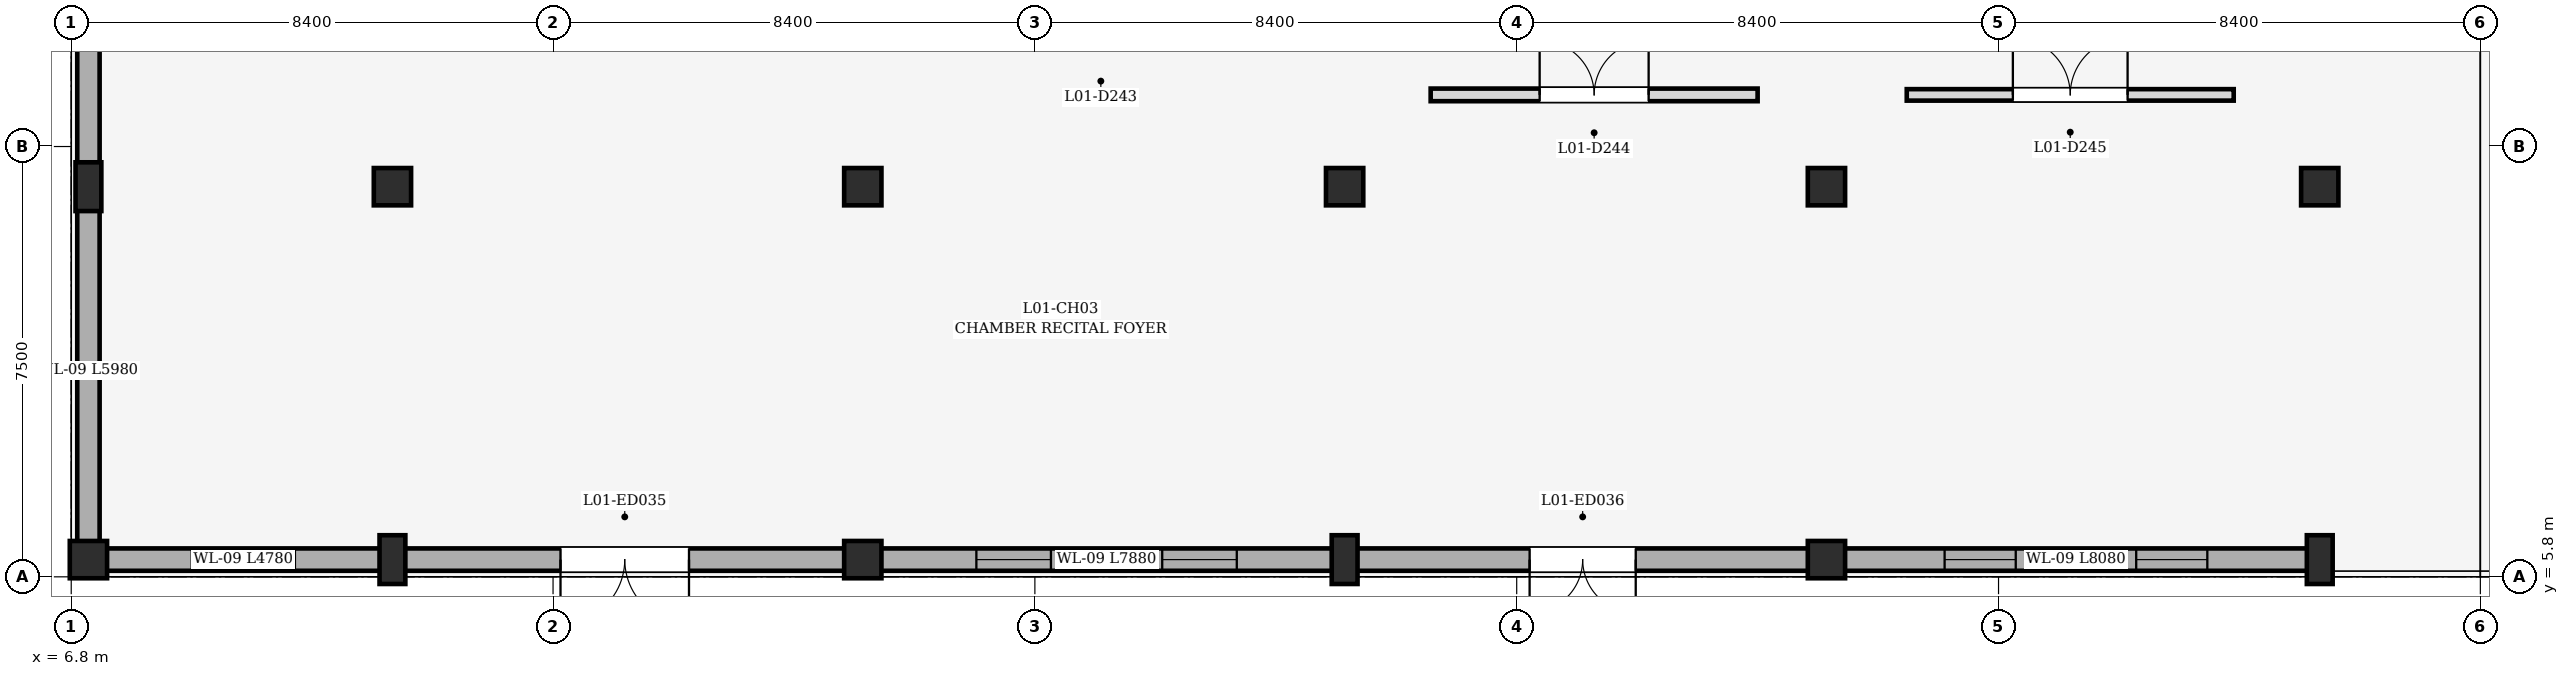
"""IFC4 building model, lengths in metres.
Left out: names, types, materials, properties, quantities, classifications, styles, units other than length and angle.
Written with IfcOpenShell. Run it as: python <this file> out.ifc"""

import sys

from ifc_helpers import new_model, si_unit, direction, frame, frame_2d, origin, origin_2d, place, context, subcontext, project, spatial, rectangle, extrude, element, fill, save


model = new_model("IFC4")
c1 = context("Model", 3, precision=1e-05, world=origin(), true_north=direction((0.0, 1.0)))
c2 = subcontext(c1, "Body", "Model", "MODEL_VIEW")
j1 = project(units=[si_unit("LENGTHUNIT", "METRE"), si_unit("PLANEANGLEUNIT", "RADIAN")], contexts=[c1])
p1 = place(None, origin())
s1 = spatial("IfcSite", under=j1, at=p1, CompositionType="ELEMENT")
p2 = place(p1, origin())
s2 = spatial("IfcBuilding", under=s1, at=p2, CompositionType="ELEMENT")
p3 = place(p2, origin())
s3 = spatial("IfcBuildingStorey", under=s2, at=p3, CompositionType="ELEMENT", Elevation=0.0)
p4 = place(p3, frame((7.1, 6.1, 0.0), z_axis=(0.0, 0.0, 1.0), x_axis=(1.0, 0.0, 0.0)))
e1 = element("IfcColumn", 1, at=p4, inside=s3, PredefinedType="COLUMN", context=c2, shape_type="SweptSolid", body=[
    extrude(rectangle(XDim=0.65, YDim=0.65, at=origin_2d()), origin(), (0.0, 0.0, 1.0), 5.4),
])
for number, where, z_axis, x_axis in (
    (2, (7.1, 12.6, 0.0), (0.0, 0.0, 1.0), (1.0, 0.0, 0.0)),
    (3, (12.4, 6.1, 0.0), (0.0, 0.0, 1.0), (1.0, 0.0, 0.0)),
):
    element("IfcColumn", number, at=place(p3, frame(where, z_axis=z_axis, x_axis=x_axis)), inside=s3, PredefinedType="PILASTER", context=c2, shape_type="SweptSolid", body=[
        extrude(rectangle(XDim=0.45, YDim=0.85, at=origin_2d()), origin(), (0.0, 0.0, 1.0), 5.4),
    ])
for number, where, z_axis, x_axis in (
    (4, (12.4, 12.6, 0.0), (0.0, 0.0, 1.0), (1.0, 0.0, 0.0)),
    (5, (20.6, 6.1, 0.0), (0.0, 0.0, 1.0), (1.0, 0.0, 0.0)),
    (6, (20.6, 12.6, 0.0), (0.0, 0.0, 1.0), (1.0, 0.0, 0.0)),
):
    element("IfcColumn", number, at=place(p3, frame(where, z_axis=z_axis, x_axis=x_axis)), inside=s3, PredefinedType="COLUMN", context=c2, shape_type="SweptSolid", body=[
        extrude(rectangle(XDim=0.65, YDim=0.65, at=origin_2d()), origin(), (0.0, 0.0, 1.0), 5.4),
    ])
p5 = place(p3, frame((29.0, 6.1, 0.0), z_axis=(0.0, 0.0, 1.0), x_axis=(1.0, 0.0, 0.0)))
e7 = element("IfcColumn", 7, at=p5, inside=s3, PredefinedType="PILASTER", context=c2, shape_type="SweptSolid", body=[
    extrude(rectangle(XDim=0.45, YDim=0.85, at=origin_2d()), origin(), (0.0, 0.0, 1.0), 5.4),
])
for number, where, z_axis, x_axis in (
    (8, (29.0, 12.6, 0.0), (0.0, 0.0, 1.0), (1.0, 0.0, 0.0)),
    (9, (37.4, 6.1, 0.0), (0.0, 0.0, 1.0), (1.0, 0.0, 0.0)),
    (10, (37.4, 12.6, 0.0), (0.0, 0.0, 1.0), (1.0, 0.0, 0.0)),
):
    element("IfcColumn", number, at=place(p3, frame(where, z_axis=z_axis, x_axis=x_axis)), inside=s3, PredefinedType="COLUMN", context=c2, shape_type="SweptSolid", body=[
        extrude(rectangle(XDim=0.65, YDim=0.65, at=origin_2d()), origin(), (0.0, 0.0, 1.0), 5.4),
    ])
p6 = place(p3, frame((46.0, 6.1, 0.0), z_axis=(0.0, 0.0, 1.0), x_axis=(1.0, 0.0, 0.0)))
e11 = element("IfcColumn", 11, at=p6, inside=s3, PredefinedType="PILASTER", context=c2, shape_type="SweptSolid", body=[
    extrude(rectangle(XDim=0.45, YDim=0.85, at=origin_2d()), origin(), (0.0, 0.0, 1.0), 5.4),
])
p7 = place(p3, frame((46.0, 12.6, 0.0), z_axis=(0.0, 0.0, 1.0), x_axis=(1.0, 0.0, 0.0)))
e12 = element("IfcColumn", 12, at=p7, inside=s3, PredefinedType="COLUMN", context=c2, shape_type="SweptSolid", body=[
    extrude(rectangle(XDim=0.65, YDim=0.65, at=origin_2d()), origin(), (0.0, 0.0, 1.0), 5.4),
])
p8 = place(p3, frame((12.19, 6.1, 0.0), z_axis=(0.0, 0.0, 1.0), x_axis=(-1.0, 0.0, 0.0)))
e13 = element("IfcWall", 13, at=p8, inside=s3, PredefinedType="STANDARD", context=c2, shape_type="SweptSolid", body=[
    extrude(rectangle(XDim=4.78, YDim=0.39, at=frame_2d((2.39, 0.0))), origin(), (0.0, 0.0, 1.0), 4.6),
])
p9 = place(p8, frame((1.49, 0.0, 0.85)))
e14 = element("IfcOpeningElement", 14, at=p9, cuts=e13, PredefinedType="OPENING", context=c2, shape_type="SweptSolid", body=[
    extrude(rectangle(XDim=1.8, YDim=2.2, at=frame_2d((0.9, 1.1))), frame((0.0, 0.207, 0.0), z_axis=(0.0, -1.0, 0.0), x_axis=(1.0, 0.0, 0.0)), (0.0, 0.0, 1.0), 0.414),
])
p10 = place(p3, frame((20.29, 6.1, 0.0), z_axis=(0.0, 0.0, 1.0), x_axis=(-1.0, 0.0, 0.0)))
e15 = element("IfcWall", 15, at=p10, inside=s3, PredefinedType="STANDARD", context=c2, shape_type="SweptSolid", body=[
    extrude(rectangle(XDim=7.68, YDim=0.39, at=frame_2d((3.84, 0.0))), origin(), (0.0, 0.0, 1.0), 4.6),
])
p11 = place(p10, frame((2.72, 0.0, 0.0)))
e16 = element("IfcOpeningElement", 16, at=p11, cuts=e15, PredefinedType="OPENING", context=c2, shape_type="SweptSolid", body=[
    extrude(rectangle(XDim=2.24, YDim=2.35, at=frame_2d((1.12, 1.175))), frame((0.0, 0.207, 0.0), z_axis=(0.0, -1.0, 0.0), x_axis=(1.0, 0.0, 0.0)), (0.0, 0.0, 1.0), 0.414),
])
p12 = place(p3, frame((28.79, 6.1, 0.0), z_axis=(0.0, 0.0, 1.0), x_axis=(-1.0, 0.0, 0.0)))
e17 = element("IfcWall", 17, at=p12, inside=s3, PredefinedType="STANDARD", context=c2, shape_type="SweptSolid", body=[
    extrude(rectangle(XDim=7.88, YDim=0.39, at=frame_2d((3.94, 0.0))), origin(), (0.0, 0.0, 1.0), 4.6),
])
p13 = place(p12, frame((1.67, 0.0, 0.85)))
e18 = element("IfcOpeningElement", 18, at=p13, cuts=e17, PredefinedType="OPENING", context=c2, shape_type="SweptSolid", body=[
    extrude(rectangle(XDim=1.3, YDim=1.95, at=frame_2d((0.65, 0.975))), frame((0.0, 0.207, 0.0), z_axis=(0.0, -1.0, 0.0), x_axis=(1.0, 0.0, 0.0)), (0.0, 0.0, 1.0), 0.414),
])
p14 = place(p12, frame((4.91, 0.0, 0.85)))
e19 = element("IfcOpeningElement", 19, at=p14, cuts=e17, PredefinedType="OPENING", context=c2, shape_type="SweptSolid", body=[
    extrude(rectangle(XDim=1.3, YDim=1.95, at=frame_2d((0.65, 0.975))), frame((0.0, 0.207, 0.0), z_axis=(0.0, -1.0, 0.0), x_axis=(1.0, 0.0, 0.0)), (0.0, 0.0, 1.0), 0.414),
])
p15 = place(p3, frame((37.09, 6.1, 0.0), z_axis=(0.0, 0.0, 1.0), x_axis=(-1.0, 0.0, 0.0)))
e20 = element("IfcWall", 20, at=p15, inside=s3, PredefinedType="STANDARD", context=c2, shape_type="SweptSolid", body=[
    extrude(rectangle(XDim=7.88, YDim=0.39, at=frame_2d((3.94, 0.0))), origin(), (0.0, 0.0, 1.0), 4.579),
])
p16 = place(p15, frame((3.015, 0.0, 0.0)))
e21 = element("IfcOpeningElement", 21, at=p16, cuts=e20, PredefinedType="OPENING", context=c2, shape_type="SweptSolid", body=[
    extrude(rectangle(XDim=1.85, YDim=2.25, at=frame_2d((0.925, 1.125))), frame((0.0, 0.207, 0.0), z_axis=(0.0, -1.0, 0.0), x_axis=(1.0, 0.0, 0.0)), (0.0, 0.0, 1.0), 0.414),
])
p17 = place(p3, frame((45.79, 6.1, 0.0), z_axis=(0.0, 0.0, 1.0), x_axis=(-1.0, 0.0, 0.0)))
e22 = element("IfcWall", 22, at=p17, inside=s3, PredefinedType="STANDARD", context=c2, shape_type="SweptSolid", body=[
    extrude(rectangle(XDim=8.08, YDim=0.39, at=frame_2d((4.04, 0.0))), origin(), (0.0, 0.0, 1.0), 4.505),
])
p18 = place(p17, frame((1.75, 0.0, 0.85)))
e23 = element("IfcOpeningElement", 23, at=p18, cuts=e22, PredefinedType="OPENING", context=c2, shape_type="SweptSolid", body=[
    extrude(rectangle(XDim=1.24, YDim=1.75, at=frame_2d((0.62, 0.875))), frame((0.0, 0.207, 0.0), z_axis=(0.0, -1.0, 0.0), x_axis=(1.0, 0.0, 0.0)), (0.0, 0.0, 1.0), 0.414),
])
p19 = place(p17, frame((5.09, 0.0, 0.85)))
e24 = element("IfcOpeningElement", 24, at=p19, cuts=e22, PredefinedType="OPENING", context=c2, shape_type="SweptSolid", body=[
    extrude(rectangle(XDim=1.24, YDim=1.75, at=frame_2d((0.62, 0.875))), frame((0.0, 0.207, 0.0), z_axis=(0.0, -1.0, 0.0), x_axis=(1.0, 0.0, 0.0)), (0.0, 0.0, 1.0), 0.414),
])
p20 = place(p3, frame((7.1, 6.41, 0.0), z_axis=(0.0, 0.0, 1.0), x_axis=(0.0, 1.0, 0.0)))
e25 = element("IfcWall", 25, at=p20, inside=s3, PredefinedType="STANDARD", context=c2, shape_type="SweptSolid", body=[
    extrude(rectangle(XDim=5.98, YDim=0.39, at=frame_2d((2.99, 0.0))), origin(), (0.0, 0.0, 1.0), 4.357),
])
p21 = place(p3, frame((7.1, 12.81, 0.0), z_axis=(0.0, 0.0, 1.0), x_axis=(0.0, 1.0, 0.0)))
e26 = element("IfcWall", 26, at=p21, inside=s3, PredefinedType="STANDARD", context=c2, shape_type="SweptSolid", body=[
    extrude(rectangle(XDim=7.68, YDim=0.39, at=frame_2d((3.84, 0.0))), origin(), (0.0, 0.0, 1.0), 4.357),
])
p22 = place(p21, frame((3.39, 0.0, 0.85)))
e27 = element("IfcOpeningElement", 27, at=p22, cuts=e26, PredefinedType="OPENING", context=c2, shape_type="SweptSolid", body=[
    extrude(rectangle(XDim=0.9, YDim=1.5, at=frame_2d((0.45, 0.75))), frame((0.0, 0.207, 0.0), z_axis=(0.0, -1.0, 0.0), x_axis=(1.0, 0.0, 0.0)), (0.0, 0.0, 1.0), 0.414),
])
p23 = place(p3, frame((30.5, 14.2, 0.0), z_axis=(0.0, 0.0, 1.0), x_axis=(1.0, 0.0, 0.0)))
e28 = element("IfcWall", 28, at=p23, inside=s3, PredefinedType="SOLIDWALL", context=c2, shape_type="SweptSolid", body=[
    extrude(rectangle(XDim=5.7, YDim=0.22, at=frame_2d((2.85, 0.0))), origin(), (0.0, 0.0, 1.0), 5.105),
])
p24 = place(p23, frame((1.9, 0.0, 0.0)))
e29 = element("IfcOpeningElement", 29, at=p24, cuts=e28, PredefinedType="OPENING", context=c2, shape_type="SweptSolid", body=[
    extrude(rectangle(XDim=1.9, YDim=2.3, at=frame_2d((0.95, 1.15))), frame((0.0, 0.122, 0.0), z_axis=(0.0, -1.0, 0.0), x_axis=(1.0, 0.0, 0.0)), (0.0, 0.0, 1.0), 0.244),
])
p25 = place(p3, frame((38.8, 14.2, 0.0), z_axis=(0.0, 0.0, 1.0), x_axis=(1.0, 0.0, 0.0)))
e30 = element("IfcWall", 30, at=p25, inside=s3, PredefinedType="PARTITIONING", context=c2, shape_type="SweptSolid", body=[
    extrude(rectangle(XDim=5.7, YDim=0.2, at=frame_2d((2.85, 0.0))), origin(), (0.0, 0.0, 1.0), 5.105),
])
p26 = place(p25, frame((1.85, 0.0, 0.0)))
e31 = element("IfcOpeningElement", 31, at=p26, cuts=e30, PredefinedType="OPENING", context=c2, shape_type="SweptSolid", body=[
    extrude(rectangle(XDim=2.0, YDim=2.35, at=frame_2d((1.0, 1.175))), frame((0.0, 0.112, 0.0), z_axis=(0.0, -1.0, 0.0), x_axis=(1.0, 0.0, 0.0)), (0.0, 0.0, 1.0), 0.224),
])
p27 = place(p9, origin())
e32 = element("IfcWindow", 32, at=p27, inside=s3, PartitioningType="DOUBLE_PANEL_VERTICAL", PredefinedType="WINDOW", context=c2, shape_type="SweptSolid", body=[
    extrude(rectangle(XDim=1.8, YDim=2.2, at=frame_2d((0.9, 1.1))), frame((0.0, 0.03, 0.0), z_axis=(0.0, -1.0, 0.0), x_axis=(1.0, 0.0, 0.0)), (0.0, 0.0, 1.0), 0.06),
])
fill(e14, e32)
p28 = place(p11, origin())
e33 = element("IfcDoor", 33, at=p28, inside=s3, OperationType="DOUBLE_DOOR_SINGLE_SWING", PredefinedType="DOOR", context=c2, shape_type="SweptSolid", body=[
    extrude(rectangle(XDim=2.24, YDim=2.35, at=frame_2d((1.12, 1.175))), frame((0.0, 0.025, 0.0), z_axis=(0.0, -1.0, 0.0), x_axis=(1.0, 0.0, 0.0)), (0.0, 0.0, 1.0), 0.05),
])
fill(e16, e33)
p29 = place(p13, origin())
e34 = element("IfcWindow", 34, at=p29, inside=s3, PartitioningType="DOUBLE_PANEL_VERTICAL", PredefinedType="WINDOW", context=c2, shape_type="SweptSolid", body=[
    extrude(rectangle(XDim=1.3, YDim=1.95, at=frame_2d((0.65, 0.975))), frame((0.0, 0.03, 0.0), z_axis=(0.0, -1.0, 0.0), x_axis=(1.0, 0.0, 0.0)), (0.0, 0.0, 1.0), 0.06),
])
fill(e18, e34)
p30 = place(p14, origin())
e35 = element("IfcWindow", 35, at=p30, inside=s3, PartitioningType="DOUBLE_PANEL_VERTICAL", PredefinedType="WINDOW", context=c2, shape_type="SweptSolid", body=[
    extrude(rectangle(XDim=1.3, YDim=1.95, at=frame_2d((0.65, 0.975))), frame((0.0, 0.03, 0.0), z_axis=(0.0, -1.0, 0.0), x_axis=(1.0, 0.0, 0.0)), (0.0, 0.0, 1.0), 0.06),
])
fill(e19, e35)
p31 = place(p16, origin())
e36 = element("IfcDoor", 36, at=p31, inside=s3, OperationType="DOUBLE_DOOR_SINGLE_SWING", PredefinedType="DOOR", context=c2, shape_type="SweptSolid", body=[
    extrude(rectangle(XDim=1.85, YDim=2.25, at=frame_2d((0.925, 1.125))), frame((0.0, 0.025, 0.0), z_axis=(0.0, -1.0, 0.0), x_axis=(1.0, 0.0, 0.0)), (0.0, 0.0, 1.0), 0.05),
])
fill(e21, e36)
p32 = place(p18, origin())
e37 = element("IfcWindow", 37, at=p32, inside=s3, PartitioningType="DOUBLE_PANEL_VERTICAL", PredefinedType="WINDOW", context=c2, shape_type="SweptSolid", body=[
    extrude(rectangle(XDim=1.24, YDim=1.75, at=frame_2d((0.62, 0.875))), frame((0.0, 0.03, 0.0), z_axis=(0.0, -1.0, 0.0), x_axis=(1.0, 0.0, 0.0)), (0.0, 0.0, 1.0), 0.06),
])
fill(e23, e37)
p33 = place(p19, origin())
e38 = element("IfcWindow", 38, at=p33, inside=s3, PartitioningType="DOUBLE_PANEL_VERTICAL", PredefinedType="WINDOW", context=c2, shape_type="SweptSolid", body=[
    extrude(rectangle(XDim=1.24, YDim=1.75, at=frame_2d((0.62, 0.875))), frame((0.0, 0.03, 0.0), z_axis=(0.0, -1.0, 0.0), x_axis=(1.0, 0.0, 0.0)), (0.0, 0.0, 1.0), 0.06),
])
fill(e24, e38)
p34 = place(p24, origin())
e39 = element("IfcDoor", 39, at=p34, inside=s3, OperationType="DOUBLE_DOOR_SINGLE_SWING", PredefinedType="DOOR", context=c2, shape_type="SweptSolid", body=[
    extrude(rectangle(XDim=1.9, YDim=2.3, at=frame_2d((0.95, 1.15))), frame((0.0, 0.025, 0.0), z_axis=(0.0, -1.0, 0.0), x_axis=(1.0, 0.0, 0.0)), (0.0, 0.0, 1.0), 0.05),
])
fill(e29, e39)
p35 = place(p26, origin())
e40 = element("IfcDoor", 40, at=p35, inside=s3, OperationType="DOUBLE_DOOR_SINGLE_SWING", PredefinedType="DOOR", context=c2, shape_type="SweptSolid", body=[
    extrude(rectangle(XDim=2.0, YDim=2.35, at=frame_2d((1.0, 1.175))), frame((0.0, 0.025, 0.0), z_axis=(0.0, -1.0, 0.0), x_axis=(1.0, 0.0, 0.0)), (0.0, 0.0, 1.0), 0.05),
])
fill(e31, e40)
save(model, sys.argv[1])
